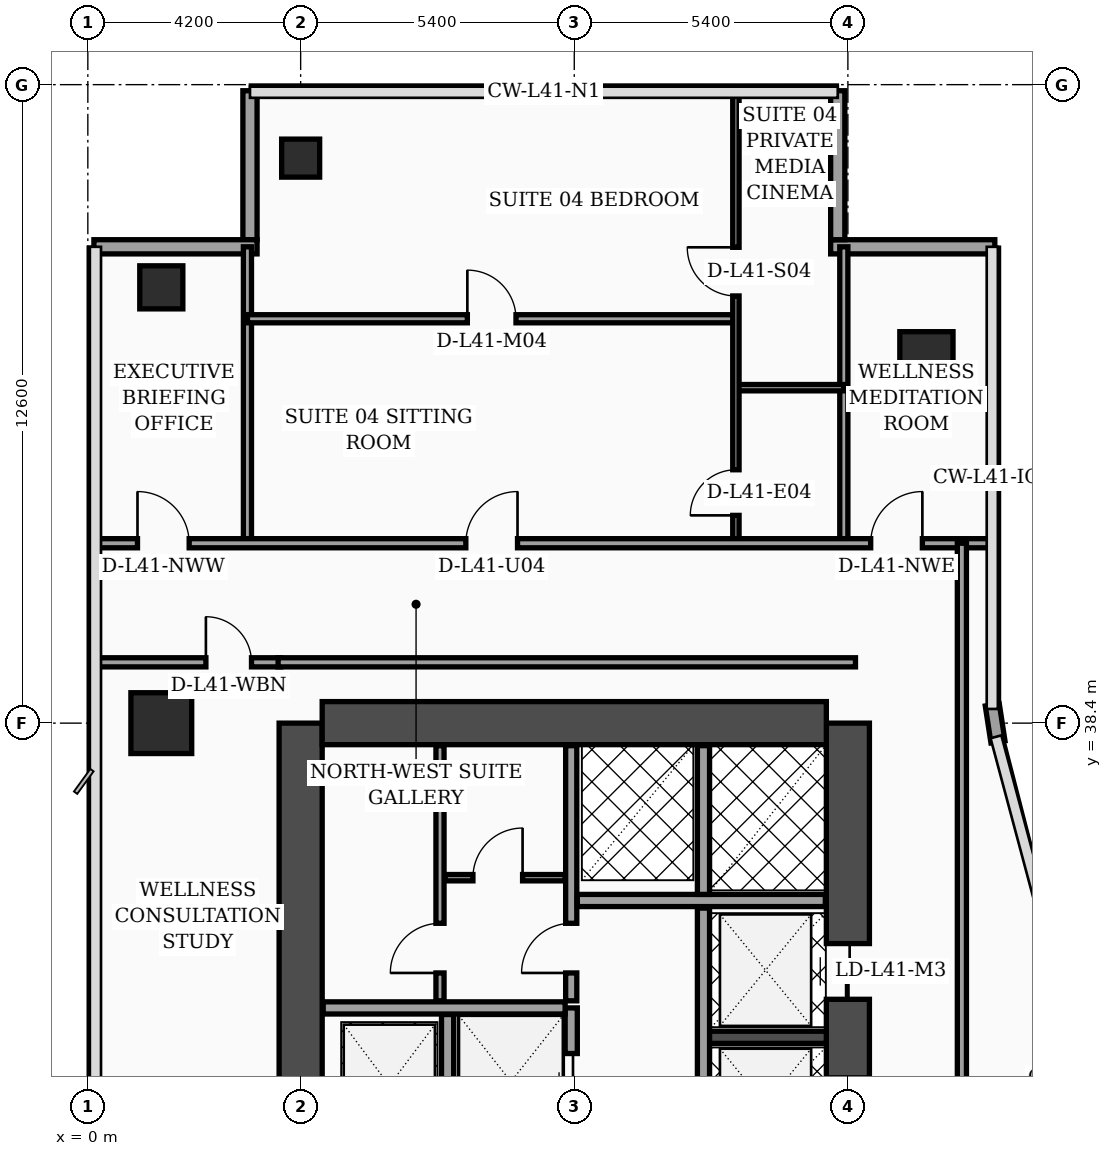
"""IFC4 building model, lengths in metres.
Left out: names, types, materials, properties, quantities, classifications, styles, units other than length and angle.
Written with IfcOpenShell. Run it as: python <this file> out.ifc"""

import sys

from ifc_helpers import new_model, si_unit, direction, frame, frame_2d, origin, origin_2d, place, context, subcontext, project, spatial, rectangle, hollow_rectangle, extrude, element, fill, save


model = new_model("IFC4")
c1 = context("Model", 3, precision=1e-05, world=origin(), true_north=direction((0.0, 1.0)))
c2 = subcontext(c1, "Body", "Model", "MODEL_VIEW")
j1 = project(units=[si_unit("LENGTHUNIT", "METRE"), si_unit("PLANEANGLEUNIT", "RADIAN")], contexts=[c1])
p1 = place(None, origin())
s1 = spatial("IfcSite", under=j1, at=p1, CompositionType="ELEMENT")
p2 = place(p1, origin())
s2 = spatial("IfcBuilding", under=s1, at=p2, CompositionType="ELEMENT")
p3 = place(p2, frame((0.0, 0.0, 167.5)))
s3 = spatial("IfcBuildingStorey", under=s2, at=p3, CompositionType="ELEMENT", Elevation=167.5)
p4 = place(p3, frame((4.2, 16.8, 0.0), z_axis=(0.0, 0.0, 1.0), x_axis=(0.0, 1.0, 0.0)))
e1 = element("IfcWall", 1, at=p4, inside=s3, PredefinedType="SHEAR", context=c2, shape_type="SweptSolid", body=[
    extrude(rectangle(XDim=21.6, YDim=0.85, at=frame_2d((10.8, 0.0))), origin(), (0.0, 0.0, 1.0), 3.56),
])
p5 = place(p3, frame((15.0, 16.8, 0.0), z_axis=(0.0, 0.0, 1.0), x_axis=(0.0, 1.0, 0.0)))
e2 = element("IfcWall", 2, at=p5, inside=s3, PredefinedType="SHEAR", context=c2, shape_type="SweptSolid", body=[
    extrude(rectangle(XDim=21.6, YDim=0.85, at=frame_2d((10.8, 0.0))), origin(), (0.0, 0.0, 1.0), 3.56),
])
p6 = place(p5, frame((8.65, 0.0, 0.0)))
e3 = element("IfcOpeningElement", 3, at=p6, cuts=e2, PredefinedType="OPENING", context=c2, shape_type="SweptSolid", body=[
    extrude(rectangle(XDim=1.1, YDim=2.2, at=frame_2d((0.55, 1.1))), frame((0.0, 0.435, 0.0), z_axis=(0.0, -1.0, 0.0), x_axis=(1.0, 0.0, 0.0)), (0.0, 0.0, 1.0), 0.87),
])
p7 = place(p5, frame((10.85, 0.0, 0.0)))
e4 = element("IfcOpeningElement", 4, at=p7, cuts=e2, PredefinedType="OPENING", context=c2, shape_type="SweptSolid", body=[
    extrude(rectangle(XDim=1.1, YDim=2.2, at=frame_2d((0.55, 1.1))), frame((0.0, 0.435, 0.0), z_axis=(0.0, -1.0, 0.0), x_axis=(1.0, 0.0, 0.0)), (0.0, 0.0, 1.0), 0.87),
])
p8 = place(p5, frame((13.5, 0.0, 0.0)))
e5 = element("IfcOpeningElement", 5, at=p8, cuts=e2, PredefinedType="OPENING", context=c2, shape_type="SweptSolid", body=[
    extrude(rectangle(XDim=1.1, YDim=2.2, at=frame_2d((0.55, 1.1))), frame((0.0, 0.435, 0.0), z_axis=(0.0, -1.0, 0.0), x_axis=(1.0, 0.0, 0.0)), (0.0, 0.0, 1.0), 0.87),
])
p9 = place(p5, frame((16.15, 0.0, 0.0)))
e6 = element("IfcOpeningElement", 6, at=p9, cuts=e2, PredefinedType="OPENING", context=c2, shape_type="SweptSolid", body=[
    extrude(rectangle(XDim=1.1, YDim=2.2, at=frame_2d((0.55, 1.1))), frame((0.0, 0.435, 0.0), z_axis=(0.0, -1.0, 0.0), x_axis=(1.0, 0.0, 0.0)), (0.0, 0.0, 1.0), 0.87),
])
p10 = place(p3, frame((4.625, 38.4, 0.0), z_axis=(0.0, 0.0, 1.0), x_axis=(1.0, 0.0, 0.0)))
e7 = element("IfcWall", 7, at=p10, inside=s3, PredefinedType="SHEAR", context=c2, shape_type="SweptSolid", body=[
    extrude(rectangle(XDim=9.95, YDim=0.85, at=frame_2d((4.975, 0.0))), origin(), (0.0, 0.0, 1.0), 3.56),
])
p11 = place(p3, frame((12.18, 32.2, 0.0), z_axis=(0.0, 0.0, 1.0), x_axis=(1.0, 0.0, 0.0)))
e8 = element("IfcWall", 8, at=p11, inside=s3, PredefinedType="SOLIDWALL", context=c2, shape_type="SweptSolid", body=[
    extrude(rectangle(XDim=2.395, YDim=0.24, at=frame_2d((1.198, 0.0))), origin(), (0.0, 0.0, 1.0), 3.56),
])
p12 = place(p3, frame((1.45, 38.4, 0.0), z_axis=(0.0, 0.0, 1.0), x_axis=(1.0, 0.0, 0.0)))
e9 = element("IfcColumn", 9, at=p12, inside=s3, PredefinedType="COLUMN", context=c2, shape_type="SweptSolid", body=[
    extrude(rectangle(XDim=1.2, YDim=1.2, at=origin_2d()), origin(), (0.0, 0.0, 1.0), 3.56),
])
p13 = place(p3, frame((1.45, 47.0, 0.0), z_axis=(0.0, 0.0, 1.0), x_axis=(1.0, 0.0, 0.0)))
e10 = element("IfcColumn", 10, at=p13, inside=s3, PredefinedType="COLUMN", context=c2, shape_type="SweptSolid", body=[
    extrude(hollow_rectangle(XDim=0.85, YDim=0.85, WallThickness=0.036, at=origin_2d()), origin(), (0.0, 0.0, 1.0), 3.56),
])
p14 = place(p3, frame((4.2, 49.55, 0.0), z_axis=(0.0, 0.0, 1.0), x_axis=(1.0, 0.0, 0.0)))
e11 = element("IfcColumn", 11, at=p14, inside=s3, PredefinedType="COLUMN", context=c2, shape_type="SweptSolid", body=[
    extrude(hollow_rectangle(XDim=0.75, YDim=0.75, WallThickness=0.032, at=origin_2d()), origin(), (0.0, 0.0, 1.0), 3.56),
])
p15 = place(p3, frame((16.55, 45.6, 0.0), z_axis=(0.0, 0.0, 1.0), x_axis=(1.0, 0.0, 0.0)))
e12 = element("IfcColumn", 12, at=p15, inside=s3, PredefinedType="COLUMN", context=c2, shape_type="SweptSolid", body=[
    extrude(rectangle(XDim=1.05, YDim=1.05, at=origin_2d()), origin(), (0.0, 0.0, 1.0), 3.56),
])
p16 = place(p3, frame((17.962, 38.03, 0.0), z_axis=(0.0, 0.0, 1.0), x_axis=(-0.15141125477, 0.988470855377, 0.0)))
e13 = element("IfcWall", 13, at=p16, inside=s3, PredefinedType="SOLIDWALL", context=c2, shape_type="SweptSolid", body=[
    extrude(rectangle(XDim=0.739, YDim=0.28, at=frame_2d((0.369, 0.0))), origin(), (0.0, 0.0, 1.0), 3.56),
])
p17 = place(p3, frame((17.9, 47.8, 0.0), z_axis=(0.0, 0.0, 1.0), x_axis=(-1.0, 0.0, 0.0)))
e14 = element("IfcWall", 14, at=p17, inside=s3, PredefinedType="SOLIDWALL", context=c2, shape_type="SweptSolid", body=[
    extrude(rectangle(XDim=3.24, YDim=0.28, at=frame_2d((1.62, 0.0))), origin(), (0.0, 0.0, 1.0), 3.56),
])
p18 = place(p3, frame((14.8, 47.94, 0.0), z_axis=(0.0, 0.0, 1.0), x_axis=(0.0, 1.0, 0.0)))
e15 = element("IfcWall", 15, at=p18, inside=s3, PredefinedType="SOLIDWALL", context=c2, shape_type="SweptSolid", body=[
    extrude(rectangle(XDim=2.94, YDim=0.28, at=frame_2d((1.47, 0.0))), origin(), (0.0, 0.0, 1.0), 3.56),
])
p19 = place(p3, frame((3.2, 50.88, 0.0), z_axis=(0.0, 0.0, 1.0), x_axis=(0.0, -1.0, 0.0)))
e16 = element("IfcWall", 16, at=p19, inside=s3, PredefinedType="SOLIDWALL", context=c2, shape_type="SweptSolid", body=[
    extrude(rectangle(XDim=2.94, YDim=0.28, at=frame_2d((1.47, 0.0))), origin(), (0.0, 0.0, 1.0), 3.04),
])
p20 = place(p3, frame((3.34, 47.8, 0.0), z_axis=(0.0, 0.0, 1.0), x_axis=(-1.0, 0.0, 0.0)))
e17 = element("IfcWall", 17, at=p20, inside=s3, PredefinedType="SOLIDWALL", context=c2, shape_type="SweptSolid", body=[
    extrude(rectangle(XDim=3.22, YDim=0.28, at=frame_2d((1.61, 0.0))), origin(), (0.0, 0.0, 1.0), 3.04),
])
p21 = place(p3, frame((7.1, 30.02, 0.0), z_axis=(0.0, 0.0, 1.0), x_axis=(0.0, 1.0, 0.0)))
e18 = element("IfcWall", 18, at=p21, inside=s3, PredefinedType="SOLIDWALL", context=c2, shape_type="SweptSolid", body=[
    extrude(rectangle(XDim=2.63, YDim=0.24, at=frame_2d((1.315, 0.0))), origin(), (0.0, 0.0, 1.0), 3.56),
])
p22 = place(p3, frame((9.54, 29.88, 0.0), z_axis=(0.0, 0.0, 1.0), x_axis=(0.0, 1.0, 0.0)))
e19 = element("IfcWall", 19, at=p22, inside=s3, PredefinedType="SOLIDWALL", context=c2, shape_type="SweptSolid", body=[
    extrude(rectangle(XDim=2.9, YDim=0.24, at=frame_2d((1.45, 0.0))), origin(), (0.0, 0.0, 1.0), 3.56),
])
p23 = place(p22, frame((0.7, 0.0, 0.0)))
e20 = element("IfcOpeningElement", 20, at=p23, cuts=e19, PredefinedType="OPENING", context=c2, shape_type="SweptSolid", body=[
    extrude(rectangle(XDim=1.3, YDim=2.35, at=frame_2d((0.65, 1.175))), frame((0.0, 0.13, 0.0), z_axis=(0.0, -1.0, 0.0), x_axis=(1.0, 0.0, 0.0)), (0.0, 0.0, 1.0), 0.26),
])
p24 = place(p3, frame((4.645, 32.78, 0.0), z_axis=(0.0, 0.0, 1.0), x_axis=(1.0, 0.0, 0.0)))
e21 = element("IfcWall", 21, at=p24, inside=s3, PredefinedType="SOLIDWALL", context=c2, shape_type="SweptSolid", body=[
    extrude(rectangle(XDim=4.775, YDim=0.24, at=frame_2d((2.387, 0.0))), origin(), (0.0, 0.0, 1.0), 3.19),
])
p25 = place(p3, frame((6.95, 32.92, 0.0), z_axis=(0.0, 0.0, 1.0), x_axis=(0.0, 1.0, 0.0)))
e22 = element("IfcWall", 22, at=p25, inside=s3, PredefinedType="PARTITIONING", context=c2, shape_type="SweptSolid", body=[
    extrude(rectangle(XDim=5.035, YDim=0.16, at=frame_2d((2.518, 0.0))), origin(), (0.0, 0.0, 1.0), 3.56),
])
p26 = place(p25, frame((0.55, 0.0, 0.0)))
e23 = element("IfcOpeningElement", 23, at=p26, cuts=e22, PredefinedType="OPENING", context=c2, shape_type="SweptSolid", body=[
    extrude(rectangle(XDim=0.98, YDim=2.15, at=frame_2d((0.49, 1.075))), frame((0.0, 0.09, 0.0), z_axis=(0.0, -1.0, 0.0), x_axis=(1.0, 0.0, 0.0)), (0.0, 0.0, 1.0), 0.18),
])
p27 = place(p3, frame((7.05, 35.35, 0.0), z_axis=(0.0, 0.0, 1.0), x_axis=(1.0, 0.0, 0.0)))
e24 = element("IfcWall", 24, at=p27, inside=s3, PredefinedType="PARTITIONING", context=c2, shape_type="SweptSolid", body=[
    extrude(rectangle(XDim=2.37, YDim=0.125, at=frame_2d((1.185, 0.0))), origin(), (0.0, 0.0, 1.0), 3.56),
])
p28 = place(p27, frame((0.55, 0.0, 0.0)))
e25 = element("IfcOpeningElement", 25, at=p28, cuts=e24, PredefinedType="OPENING", context=c2, shape_type="SweptSolid", body=[
    extrude(rectangle(XDim=0.98, YDim=2.15, at=frame_2d((0.49, 1.075))), frame((0.0, 0.073, 0.0), z_axis=(0.0, -1.0, 0.0), x_axis=(1.0, 0.0, 0.0)), (0.0, 0.0, 1.0), 0.145),
])
p29 = place(p3, frame((9.54, 32.92, 0.0), z_axis=(0.0, 0.0, 1.0), x_axis=(0.0, 1.0, 0.0)))
e26 = element("IfcWall", 26, at=p29, inside=s3, PredefinedType="SOLIDWALL", context=c2, shape_type="SweptSolid", body=[
    extrude(rectangle(XDim=5.035, YDim=0.22, at=frame_2d((2.518, 0.0))), origin(), (0.0, 0.0, 1.0), 3.56),
])
p30 = place(p29, frame((0.55, 0.0, 0.0)))
e27 = element("IfcOpeningElement", 27, at=p30, cuts=e26, PredefinedType="OPENING", context=c2, shape_type="SweptSolid", body=[
    extrude(rectangle(XDim=0.98, YDim=2.15, at=frame_2d((0.49, 1.075))), frame((0.0, 0.12, 0.0), z_axis=(0.0, -1.0, 0.0), x_axis=(1.0, 0.0, 0.0)), (0.0, 0.0, 1.0), 0.24),
])
p31 = place(p3, frame((12.15, 27.0, 0.0), z_axis=(0.0, 0.0, 1.0), x_axis=(0.0, 1.0, 0.0)))
e28 = element("IfcWall", 28, at=p31, inside=s3, PredefinedType="SOLIDWALL", context=c2, shape_type="SweptSolid", body=[
    extrude(rectangle(XDim=7.75, YDim=0.24, at=frame_2d((3.875, 0.0))), origin(), (0.0, 0.0, 1.0), 3.56),
])
p32 = place(p3, frame((9.66, 34.9, 0.0), z_axis=(0.0, 0.0, 1.0), x_axis=(1.0, 0.0, 0.0)))
e29 = element("IfcWall", 29, at=p32, inside=s3, PredefinedType="SOLIDWALL", context=c2, shape_type="SweptSolid", body=[
    extrude(rectangle(XDim=4.895, YDim=0.24, at=frame_2d((2.448, 0.0))), origin(), (0.0, 0.0, 1.0), 3.56),
])
p33 = place(p3, frame((12.15, 35.02, 0.0), z_axis=(0.0, 0.0, 1.0), x_axis=(0.0, 1.0, 0.0)))
e30 = element("IfcWall", 30, at=p33, inside=s3, PredefinedType="SOLIDWALL", context=c2, shape_type="SweptSolid", body=[
    extrude(rectangle(XDim=2.935, YDim=0.24, at=frame_2d((1.468, 0.0))), origin(), (0.0, 0.0, 1.0), 3.56),
])
p34 = place(p3, frame((0.08, 39.6, 0.0), z_axis=(0.0, 0.0, 1.0), x_axis=(1.0, 0.0, 0.0)))
e31 = element("IfcWall", 31, at=p34, inside=s3, PredefinedType="PARTITIONING", context=c2, shape_type="SweptSolid", body=[
    extrude(rectangle(XDim=3.725, YDim=0.18, at=frame_2d((1.862, 0.0))), origin(), (0.0, 0.0, 1.0), 2.94),
])
p35 = place(p34, frame((2.25, 0.0, 0.0)))
e32 = element("IfcOpeningElement", 32, at=p35, cuts=e31, PredefinedType="OPENING", context=c2, shape_type="SweptSolid", body=[
    extrude(rectangle(XDim=0.9, YDim=2.15, at=frame_2d((0.45, 1.075))), frame((0.0, 0.1, 0.0), z_axis=(0.0, -1.0, 0.0), x_axis=(1.0, 0.0, 0.0)), (0.0, 0.0, 1.0), 0.2),
])
p36 = place(p3, frame((3.15, 41.95, 0.0), z_axis=(0.0, 0.0, 1.0), x_axis=(0.0, 1.0, 0.0)))
e33 = element("IfcWall", 33, at=p36, inside=s3, PredefinedType="PARTITIONING", context=c2, shape_type="SweptSolid", body=[
    extrude(rectangle(XDim=5.85, YDim=0.16, at=frame_2d((2.925, 0.0))), origin(), (0.0, 0.0, 1.0), 3.14),
])
p37 = place(p3, frame((14.92, 41.95, 0.0), z_axis=(0.0, 0.0, 1.0), x_axis=(0.0, 1.0, 0.0)))
e34 = element("IfcWall", 34, at=p37, inside=s3, PredefinedType="PARTITIONING", context=c2, shape_type="SweptSolid", body=[
    extrude(rectangle(XDim=5.85, YDim=0.16, at=frame_2d((2.925, 0.0))), origin(), (0.0, 0.0, 1.0), 3.04),
])
p38 = place(p3, frame((12.79, 45.02, 0.0), z_axis=(0.0, 0.0, 1.0), x_axis=(1.0, 0.0, 0.0)))
e35 = element("IfcWall", 35, at=p38, inside=s3, PredefinedType="PARTITIONING", context=c2, shape_type="SweptSolid", body=[
    extrude(rectangle(XDim=2.13, YDim=0.125, at=frame_2d((1.065, 0.0))), origin(), (0.0, 0.0, 1.0), 3.56),
])
p39 = place(p3, frame((3.15, 46.38, 0.0), z_axis=(0.0, 0.0, 1.0), x_axis=(1.0, 0.0, 0.0)))
e36 = element("IfcWall", 36, at=p39, inside=s3, PredefinedType="PARTITIONING", context=c2, shape_type="SweptSolid", body=[
    extrude(rectangle(XDim=9.64, YDim=0.16, at=frame_2d((4.82, 0.0))), origin(), (0.0, 0.0, 1.0), 2.94),
])
p40 = place(p39, frame((4.34, 0.0, 0.0)))
e37 = element("IfcOpeningElement", 37, at=p40, cuts=e36, PredefinedType="OPENING", context=c2, shape_type="SweptSolid", body=[
    extrude(rectangle(XDim=0.96, YDim=2.2, at=frame_2d((0.48, 1.1))), frame((0.0, 0.09, 0.0), z_axis=(0.0, -1.0, 0.0), x_axis=(1.0, 0.0, 0.0)), (0.0, 0.0, 1.0), 0.18),
])
p41 = place(p3, frame((12.79, 41.95, 0.0), z_axis=(0.0, 0.0, 1.0), x_axis=(0.0, 1.0, 0.0)))
e38 = element("IfcWall", 38, at=p41, inside=s3, PredefinedType="PARTITIONING", context=c2, shape_type="SweptSolid", body=[
    extrude(rectangle(XDim=8.99, YDim=0.125, at=frame_2d((4.495, 0.0))), origin(), (0.0, 0.0, 1.0), 3.04),
])
p42 = place(p41, frame((0.55, 0.0, 0.0)))
e39 = element("IfcOpeningElement", 39, at=p42, cuts=e38, PredefinedType="OPENING", context=c2, shape_type="SweptSolid", body=[
    extrude(rectangle(XDim=0.9, YDim=2.15, at=frame_2d((0.45, 1.075))), frame((0.0, 0.073, 0.0), z_axis=(0.0, -1.0, 0.0), x_axis=(1.0, 0.0, 0.0)), (0.0, 0.0, 1.0), 0.145),
])
p43 = place(p41, frame((4.88, 0.0, 0.0)))
e40 = element("IfcOpeningElement", 40, at=p43, cuts=e38, PredefinedType="OPENING", context=c2, shape_type="SweptSolid", body=[
    extrude(rectangle(XDim=0.96, YDim=2.2, at=frame_2d((0.48, 1.1))), frame((0.0, 0.073, 0.0), z_axis=(0.0, -1.0, 0.0), x_axis=(1.0, 0.0, 0.0)), (0.0, 0.0, 1.0), 0.145),
])
p44 = place(p3, frame((0.08, 41.95, 0.0), z_axis=(0.0, 0.0, 1.0), x_axis=(1.0, 0.0, 0.0)))
e41 = element("IfcWall", 41, at=p44, inside=s3, PredefinedType="PARTITIONING", context=c2, shape_type="SweptSolid", body=[
    extrude(rectangle(XDim=17.77, YDim=0.18, at=frame_2d((8.885, 0.0))), origin(), (0.0, 0.0, 1.0), 2.94),
])
p45 = place(p44, frame((0.9, 0.0, 0.0)))
e42 = element("IfcOpeningElement", 42, at=p45, cuts=e41, PredefinedType="OPENING", context=c2, shape_type="SweptSolid", body=[
    extrude(rectangle(XDim=1.02, YDim=2.2, at=frame_2d((0.51, 1.1))), frame((0.0, 0.1, 0.0), z_axis=(0.0, -1.0, 0.0), x_axis=(1.0, 0.0, 0.0)), (0.0, 0.0, 1.0), 0.2),
])
p46 = place(p44, frame((7.38, 0.0, 0.0)))
e43 = element("IfcOpeningElement", 43, at=p46, cuts=e41, PredefinedType="OPENING", context=c2, shape_type="SweptSolid", body=[
    extrude(rectangle(XDim=1.02, YDim=2.2, at=frame_2d((0.51, 1.1))), frame((0.0, 0.1, 0.0), z_axis=(0.0, -1.0, 0.0), x_axis=(1.0, 0.0, 0.0)), (0.0, 0.0, 1.0), 0.2),
])
p47 = place(p44, frame((15.37, 0.0, 0.0)))
e44 = element("IfcOpeningElement", 44, at=p47, cuts=e41, PredefinedType="OPENING", context=c2, shape_type="SweptSolid", body=[
    extrude(rectangle(XDim=1.02, YDim=2.2, at=frame_2d((0.51, 1.1))), frame((0.0, 0.1, 0.0), z_axis=(0.0, -1.0, 0.0), x_axis=(1.0, 0.0, 0.0)), (0.0, 0.0, 1.0), 0.2),
])
p48 = place(p3, frame((17.25, 24.3, 0.0), z_axis=(0.0, 0.0, 1.0), x_axis=(0.0, 1.0, 0.0)))
e45 = element("IfcWall", 45, at=p48, inside=s3, PredefinedType="PARTITIONING", context=c2, shape_type="SweptSolid", body=[
    extrude(rectangle(XDim=17.65, YDim=0.18, at=frame_2d((8.825, 0.0))), origin(), (0.0, 0.0, 1.0), 2.94),
])
p49 = place(p3, frame((3.755, 39.6, 0.0), z_axis=(0.0, 0.0, 1.0), x_axis=(1.0, 0.0, 0.0)))
e46 = element("IfcWall", 46, at=p49, inside=s3, PredefinedType="PARTITIONING", context=c2, shape_type="SweptSolid", body=[
    extrude(rectangle(XDim=11.395, YDim=0.18, at=frame_2d((5.698, 0.0))), origin(), (0.0, 0.0, 1.0), 2.94),
])
p50 = place(p23, origin())
e47 = element("IfcDoor", 47, at=p50, inside=s3, OperationType="DOUBLE_DOOR_SLIDING", PredefinedType="DOOR", context=c2, shape_type="SweptSolid", body=[
    extrude(rectangle(XDim=1.3, YDim=2.35, at=frame_2d((0.65, 1.175))), frame((0.0, 0.025, 0.0), z_axis=(0.0, -1.0, 0.0), x_axis=(1.0, 0.0, 0.0)), (0.0, 0.0, 1.0), 0.05),
])
fill(e20, e47)
p51 = place(p26, origin())
e48 = element("IfcDoor", 48, at=p51, inside=s3, OperationType="SINGLE_SWING_LEFT", PredefinedType="DOOR", context=c2, shape_type="SweptSolid", body=[
    extrude(rectangle(XDim=0.98, YDim=2.15, at=frame_2d((0.49, 1.075))), frame((0.0, 0.025, 0.0), z_axis=(0.0, -1.0, 0.0), x_axis=(1.0, 0.0, 0.0)), (0.0, 0.0, 1.0), 0.05),
])
fill(e23, e48)
p52 = place(p28, origin())
e49 = element("IfcDoor", 49, at=p52, inside=s3, OperationType="SINGLE_SWING_RIGHT", PredefinedType="DOOR", context=c2, shape_type="SweptSolid", body=[
    extrude(rectangle(XDim=0.98, YDim=2.15, at=frame_2d((0.49, 1.075))), frame((0.0, 0.025, 0.0), z_axis=(0.0, -1.0, 0.0), x_axis=(1.0, 0.0, 0.0)), (0.0, 0.0, 1.0), 0.05),
])
fill(e25, e49)
p53 = place(p30, origin())
e50 = element("IfcDoor", 50, at=p53, inside=s3, OperationType="SINGLE_SWING_LEFT", PredefinedType="DOOR", context=c2, shape_type="SweptSolid", body=[
    extrude(rectangle(XDim=0.98, YDim=2.15, at=frame_2d((0.49, 1.075))), frame((0.0, 0.025, 0.0), z_axis=(0.0, -1.0, 0.0), x_axis=(1.0, 0.0, 0.0)), (0.0, 0.0, 1.0), 0.05),
])
fill(e27, e50)
p54 = place(p35, origin())
e51 = element("IfcDoor", 51, at=p54, inside=s3, OperationType="SINGLE_SWING_LEFT", PredefinedType="DOOR", context=c2, shape_type="SweptSolid", body=[
    extrude(rectangle(XDim=0.9, YDim=2.15, at=frame_2d((0.45, 1.075))), frame((0.0, 0.025, 0.0), z_axis=(0.0, -1.0, 0.0), x_axis=(1.0, 0.0, 0.0)), (0.0, 0.0, 1.0), 0.05),
])
fill(e32, e51)
p55 = place(p40, origin())
e52 = element("IfcDoor", 52, at=p55, inside=s3, OperationType="SINGLE_SWING_LEFT", PredefinedType="DOOR", context=c2, shape_type="SweptSolid", body=[
    extrude(rectangle(XDim=0.96, YDim=2.2, at=frame_2d((0.48, 1.1))), frame((0.0, 0.025, 0.0), z_axis=(0.0, -1.0, 0.0), x_axis=(1.0, 0.0, 0.0)), (0.0, 0.0, 1.0), 0.05),
])
fill(e37, e52)
p56 = place(p42, origin())
e53 = element("IfcDoor", 53, at=p56, inside=s3, OperationType="SINGLE_SWING_LEFT", PredefinedType="DOOR", context=c2, shape_type="SweptSolid", body=[
    extrude(rectangle(XDim=0.9, YDim=2.15, at=frame_2d((0.45, 1.075))), frame((0.0, 0.025, 0.0), z_axis=(0.0, -1.0, 0.0), x_axis=(1.0, 0.0, 0.0)), (0.0, 0.0, 1.0), 0.05),
])
fill(e39, e53)
p57 = place(p43, origin())
e54 = element("IfcDoor", 54, at=p57, inside=s3, OperationType="SINGLE_SWING_RIGHT", PredefinedType="DOOR", context=c2, shape_type="SweptSolid", body=[
    extrude(rectangle(XDim=0.96, YDim=2.2, at=frame_2d((0.48, 1.1))), frame((0.0, 0.025, 0.0), z_axis=(0.0, -1.0, 0.0), x_axis=(1.0, 0.0, 0.0)), (0.0, 0.0, 1.0), 0.05),
])
fill(e40, e54)
p58 = place(p45, origin())
e55 = element("IfcDoor", 55, at=p58, inside=s3, OperationType="SINGLE_SWING_LEFT", PredefinedType="DOOR", context=c2, shape_type="SweptSolid", body=[
    extrude(rectangle(XDim=1.02, YDim=2.2, at=frame_2d((0.51, 1.1))), frame((0.0, 0.025, 0.0), z_axis=(0.0, -1.0, 0.0), x_axis=(1.0, 0.0, 0.0)), (0.0, 0.0, 1.0), 0.05),
])
fill(e42, e55)
p59 = place(p46, origin())
e56 = element("IfcDoor", 56, at=p59, inside=s3, OperationType="SINGLE_SWING_RIGHT", PredefinedType="DOOR", context=c2, shape_type="SweptSolid", body=[
    extrude(rectangle(XDim=1.02, YDim=2.2, at=frame_2d((0.51, 1.1))), frame((0.0, 0.025, 0.0), z_axis=(0.0, -1.0, 0.0), x_axis=(1.0, 0.0, 0.0)), (0.0, 0.0, 1.0), 0.05),
])
fill(e43, e56)
p60 = place(p47, origin())
e57 = element("IfcDoor", 57, at=p60, inside=s3, OperationType="SINGLE_SWING_RIGHT", PredefinedType="DOOR", context=c2, shape_type="SweptSolid", body=[
    extrude(rectangle(XDim=1.02, YDim=2.2, at=frame_2d((0.51, 1.1))), frame((0.0, 0.025, 0.0), z_axis=(0.0, -1.0, 0.0), x_axis=(1.0, 0.0, 0.0)), (0.0, 0.0, 1.0), 0.05),
])
fill(e44, e57)
p61 = place(p9, origin())
e58 = element("IfcDoor", 58, at=p61, inside=s3, OperationType="DOUBLE_DOOR_SLIDING", PredefinedType="DOOR", context=c2, shape_type="SweptSolid", body=[
    extrude(rectangle(XDim=1.1, YDim=2.2, at=frame_2d((0.55, 1.1))), frame((0.0, 0.025, 0.0), z_axis=(0.0, -1.0, 0.0), x_axis=(1.0, 0.0, 0.0)), (0.0, 0.0, 1.0), 0.05),
])
fill(e6, e58)
save(model, sys.argv[1])
